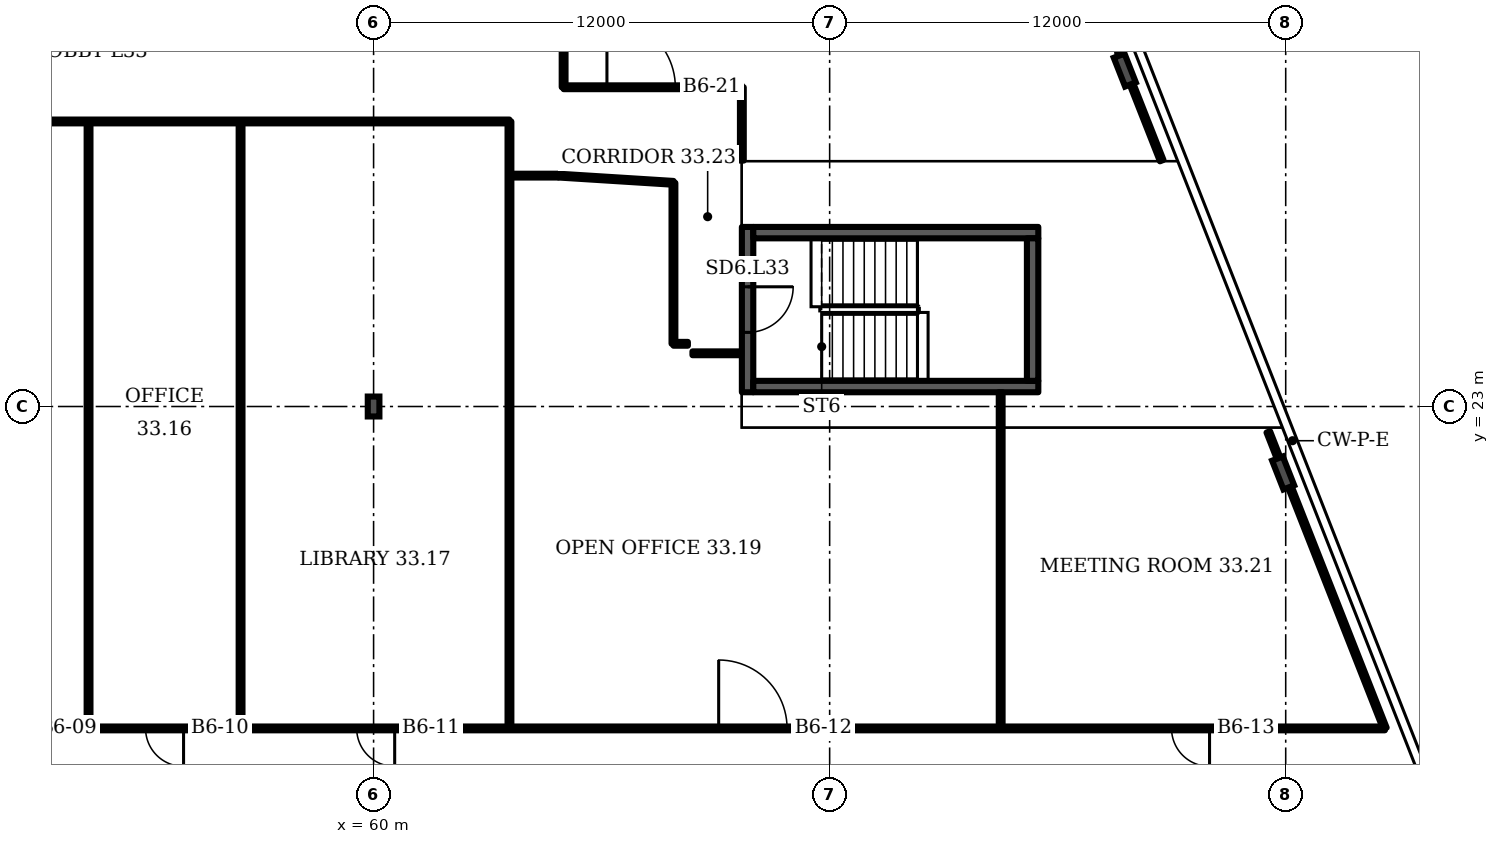
"""IFC4 building model, lengths in metres.
Left out: names, types, materials, properties, quantities, classifications, styles, units other than length and angle.
Written with IfcOpenShell. Run it as: python <this file> out.ifc"""

import sys

from ifc_helpers import new_model, si_unit, direction, frame, frame_2d, origin, origin_2d, place, context, subcontext, project, spatial, rectangle, i_section, extrude, element, fill, save


model = new_model("IFC4")
c1 = context("Model", 3, precision=1e-05, world=origin(), true_north=direction((0.0, 1.0)))
c2 = subcontext(c1, "Body", "Model", "MODEL_VIEW")
j1 = project(units=[si_unit("LENGTHUNIT", "METRE"), si_unit("PLANEANGLEUNIT", "RADIAN")], contexts=[c1])
p1 = place(None, origin())
s1 = spatial("IfcSite", under=j1, at=p1, CompositionType="ELEMENT")
p2 = place(p1, origin())
s2 = spatial("IfcBuilding", under=s1, at=p2, CompositionType="ELEMENT")
p3 = place(p2, frame((0.0, 0.0, 139.9)))
s3 = spatial("IfcBuildingStorey", under=s2, at=p3, CompositionType="ELEMENT", Elevation=139.9)
for number, where, z_axis, x_axis in (
    (1, (83.933, 21.251, 0.0), (0.0, 0.0, 1.0), (0.931, 0.366, 0.0)),
    (2, (79.766, 31.853, 0.0), (0.0, 0.0, 1.0), (0.931, 0.366, 0.0)),
):
    element("IfcColumn", number, at=place(p3, frame(where, z_axis=z_axis, x_axis=x_axis)), inside=s3, PredefinedType="COLUMN", context=c2, shape_type="SweptSolid", body=[
        extrude(i_section(OverallWidth=0.303, OverallDepth=0.814, WebThickness=0.021, FlangeThickness=0.04, FilletRadius=0.03, at=origin_2d()), origin(), (0.0, 0.0, 1.0), 3.6),
    ])
p4 = place(p3, frame((60.0, 23.0, 0.0), z_axis=(0.0, 0.0, 1.0), x_axis=(1.0, 0.0, 0.0)))
e3 = element("IfcColumn", 3, at=p4, inside=s3, PredefinedType="COLUMN", context=c2, shape_type="SweptSolid", body=[
    extrude(i_section(OverallWidth=0.306, OverallDepth=0.524, WebThickness=0.021, FlangeThickness=0.04, FilletRadius=0.027, at=origin_2d()), origin(), (0.0, 0.0, 1.0), 3.6),
])
p5 = place(p3, frame((69.84, 23.375, 0.0), z_axis=(0.0, 0.0, 1.0), x_axis=(0.0, 1.0, 0.0)))
e4 = element("IfcWall", 4, at=p5, inside=s3, PredefinedType="SHEAR", context=c2, shape_type="SweptSolid", body=[
    extrude(rectangle(XDim=4.35, YDim=0.3, at=frame_2d((2.175, 0.0))), origin(), (0.0, 0.0, 1.0), 3.2),
])
p6 = place(p5, frame((1.575, 0.0, 0.0)))
e5 = element("IfcOpeningElement", 5, at=p6, cuts=e4, PredefinedType="OPENING", context=c2, shape_type="SweptSolid", body=[
    extrude(rectangle(XDim=1.2, YDim=2.1, at=frame_2d((0.6, 1.05))), frame((0.0, 0.16, 0.0), z_axis=(0.0, -1.0, 0.0), x_axis=(1.0, 0.0, 0.0)), (0.0, 0.0, 1.0), 0.32),
])
p7 = place(p3, frame((18.2, 14.53, 0.0), z_axis=(0.0, 0.0, 1.0), x_axis=(1.0, 0.0, 0.0)))
e6 = element("IfcWall", 6, at=p7, inside=s3, PredefinedType="PARTITIONING", context=c2, shape_type="SweptSolid", body=[
    extrude(rectangle(XDim=68.41, YDim=0.1, at=frame_2d((34.205, 0.0))), origin(), (0.0, 0.0, 1.0), 3.2),
])
p8 = place(p7, frame((4.605, 0.0, 0.0)))
e7 = element("IfcOpeningElement", 7, at=p8, cuts=e6, PredefinedType="OPENING", context=c2, shape_type="SweptSolid", body=[
    extrude(rectangle(XDim=1.0, YDim=2.1, at=frame_2d((0.5, 1.05))), frame((0.0, 0.06, 0.0), z_axis=(0.0, -1.0, 0.0), x_axis=(1.0, 0.0, 0.0)), (0.0, 0.0, 1.0), 0.12),
])
p9 = place(p7, frame((23.88, 0.0, 0.0)))
e8 = element("IfcOpeningElement", 8, at=p9, cuts=e6, PredefinedType="OPENING", context=c2, shape_type="SweptSolid", body=[
    extrude(rectangle(XDim=1.0, YDim=2.1, at=frame_2d((0.5, 1.05))), frame((0.0, 0.06, 0.0), z_axis=(0.0, -1.0, 0.0), x_axis=(1.0, 0.0, 0.0)), (0.0, 0.0, 1.0), 0.12),
])
p10 = place(p7, frame((27.8, 0.0, 0.0)))
e9 = element("IfcOpeningElement", 9, at=p10, cuts=e6, PredefinedType="OPENING", context=c2, shape_type="SweptSolid", body=[
    extrude(rectangle(XDim=1.0, YDim=2.1, at=frame_2d((0.5, 1.05))), frame((0.0, 0.06, 0.0), z_axis=(0.0, -1.0, 0.0), x_axis=(1.0, 0.0, 0.0)), (0.0, 0.0, 1.0), 0.12),
])
p11 = place(p7, frame((31.8, 0.0, 0.0)))
e10 = element("IfcOpeningElement", 10, at=p11, cuts=e6, PredefinedType="OPENING", context=c2, shape_type="SweptSolid", body=[
    extrude(rectangle(XDim=1.0, YDim=2.1, at=frame_2d((0.5, 1.05))), frame((0.0, 0.06, 0.0), z_axis=(0.0, -1.0, 0.0), x_axis=(1.0, 0.0, 0.0)), (0.0, 0.0, 1.0), 0.12),
])
p12 = place(p7, frame((35.8, 0.0, 0.0)))
e11 = element("IfcOpeningElement", 11, at=p12, cuts=e6, PredefinedType="OPENING", context=c2, shape_type="SweptSolid", body=[
    extrude(rectangle(XDim=1.0, YDim=2.1, at=frame_2d((0.5, 1.05))), frame((0.0, 0.06, 0.0), z_axis=(0.0, -1.0, 0.0), x_axis=(1.0, 0.0, 0.0)), (0.0, 0.0, 1.0), 0.12),
])
p13 = place(p7, frame((41.355, 0.0, 0.0)))
e12 = element("IfcOpeningElement", 12, at=p13, cuts=e6, PredefinedType="OPENING", context=c2, shape_type="SweptSolid", body=[
    extrude(rectangle(XDim=1.0, YDim=2.1, at=frame_2d((0.5, 1.05))), frame((0.0, 0.06, 0.0), z_axis=(0.0, -1.0, 0.0), x_axis=(1.0, 0.0, 0.0)), (0.0, 0.0, 1.0), 0.12),
])
p14 = place(p7, frame((50.88, 0.0, 0.0)))
e13 = element("IfcOpeningElement", 13, at=p14, cuts=e6, PredefinedType="OPENING", context=c2, shape_type="SweptSolid", body=[
    extrude(rectangle(XDim=1.8, YDim=2.1, at=frame_2d((0.9, 1.05))), frame((0.0, 0.06, 0.0), z_axis=(0.0, -1.0, 0.0), x_axis=(1.0, 0.0, 0.0)), (0.0, 0.0, 1.0), 0.12),
])
p15 = place(p7, frame((62.796, 0.0, 0.0)))
e14 = element("IfcOpeningElement", 14, at=p15, cuts=e6, PredefinedType="OPENING", context=c2, shape_type="SweptSolid", body=[
    extrude(rectangle(XDim=1.0, YDim=2.1, at=frame_2d((0.5, 1.05))), frame((0.0, 0.06, 0.0), z_axis=(0.0, -1.0, 0.0), x_axis=(1.0, 0.0, 0.0)), (0.0, 0.0, 1.0), 0.12),
])
for number, where, z_axis, x_axis in (
    (15, (52.5, 14.53, 0.0), (0.0, 0.0, 1.0), (0.0, 1.0, 0.0)),
    (16, (56.5, 14.53, 0.0), (0.0, 0.0, 1.0), (0.0, 1.0, 0.0)),
    (17, (63.575, 14.53, 0.0), (0.0, 0.0, 1.0), (0.0, 1.0, 0.0)),
):
    element("IfcWall", number, at=place(p3, frame(where, z_axis=z_axis, x_axis=x_axis)), inside=s3, PredefinedType="PARTITIONING", context=c2, shape_type="SweptSolid", body=[
        extrude(rectangle(XDim=15.97, YDim=0.1, at=frame_2d((7.985, 0.0))), origin(), (0.0, 0.0, 1.0), 3.2),
    ])
p16 = place(p3, frame((63.575, 29.075, 0.0), z_axis=(0.0, 0.0, 1.0), x_axis=(1.0, 0.0, 0.0)))
e18 = element("IfcWall", 18, at=p16, inside=s3, PredefinedType="PARTITIONING", context=c2, shape_type="SweptSolid", body=[
    extrude(rectangle(XDim=1.285, YDim=0.1, at=frame_2d((0.643, 0.0))), origin(), (0.0, 0.0, 1.0), 3.2),
])
p17 = place(p3, frame((65.0, 31.4, 0.0), z_axis=(0.0, 0.0, 1.0), x_axis=(0.0, 1.0, 0.0)))
e19 = element("IfcWall", 19, at=p17, inside=s3, PredefinedType="PARTITIONING", context=c2, shape_type="SweptSolid", body=[
    extrude(rectangle(XDim=2.58, YDim=0.1, at=frame_2d((1.29, 0.0))), origin(), (0.0, 0.0, 1.0), 3.2),
])
p18 = place(p3, frame((65.0, 31.4, 0.0), z_axis=(0.0, 0.0, 1.0), x_axis=(1.0, 0.0, 0.0)))
e20 = element("IfcWall", 20, at=p18, inside=s3, PredefinedType="PARTITIONING", context=c2, shape_type="SweptSolid", body=[
    extrude(rectangle(XDim=4.69, YDim=0.1, at=frame_2d((2.345, 0.0))), origin(), (0.0, 0.0, 1.0), 3.2),
])
p19 = place(p18, frame((1.14, 0.0, 0.0)))
e21 = element("IfcOpeningElement", 21, at=p19, cuts=e20, PredefinedType="OPENING", context=c2, shape_type="SweptSolid", body=[
    extrude(rectangle(XDim=1.8, YDim=2.1, at=frame_2d((0.9, 1.05))), frame((0.0, 0.06, 0.0), z_axis=(0.0, -1.0, 0.0), x_axis=(1.0, 0.0, 0.0)), (0.0, 0.0, 1.0), 0.12),
])
p20 = place(p3, frame((67.89, 24.65, 0.0), z_axis=(0.0, 0.0, 1.0), x_axis=(0.0, 1.0, 0.0)))
e22 = element("IfcWall", 22, at=p20, inside=s3, PredefinedType="PARTITIONING", context=c2, shape_type="SweptSolid", body=[
    extrude(rectangle(XDim=4.235, YDim=0.1, at=frame_2d((2.118, 0.0))), origin(), (0.0, 0.0, 1.0), 3.2),
])
p21 = place(p3, frame((67.89, 24.65, 0.0), z_axis=(0.0, 0.0, 1.0), x_axis=(1.0, 0.0, 0.0)))
e23 = element("IfcWall", 23, at=p21, inside=s3, PredefinedType="PARTITIONING", context=c2, shape_type="SweptSolid", body=[
    extrude(rectangle(XDim=0.38, YDim=0.1, at=frame_2d((0.19, 0.0))), origin(), (0.0, 0.0, 1.0), 3.2),
])
p22 = place(p3, frame((67.89, 28.885, 0.0), z_axis=(0.0, 0.0, 1.0), x_axis=(-0.998031, 0.062786, 0.0)))
e24 = element("IfcWall", 24, at=p22, inside=s3, PredefinedType="PARTITIONING", context=c2, shape_type="SweptSolid", body=[
    extrude(rectangle(XDim=3.021, YDim=0.1, at=frame_2d((1.511, 0.0))), origin(), (0.0, 0.0, 1.0), 3.2),
])
p23 = place(p3, frame((68.39, 24.4, 0.0), z_axis=(0.0, 0.0, 1.0), x_axis=(1.0, 0.0, 0.0)))
e25 = element("IfcWall", 25, at=p23, inside=s3, PredefinedType="PARTITIONING", context=c2, shape_type="SweptSolid", body=[
    extrude(rectangle(XDim=1.281, YDim=0.1, at=frame_2d((0.64, 0.0))), origin(), (0.0, 0.0, 1.0), 3.2),
])
p24 = place(p3, frame((69.69, 29.47, 0.0), z_axis=(0.0, 0.0, 1.0), x_axis=(0.0, 1.0, 0.0)))
e26 = element("IfcWall", 26, at=p24, inside=s3, PredefinedType="PARTITIONING", context=c2, shape_type="SweptSolid", body=[
    extrude(rectangle(XDim=1.93, YDim=0.1, at=frame_2d((0.965, 0.0))), origin(), (0.0, 0.0, 1.0), 3.2),
])
p25 = place(p3, frame((76.5, 14.53, 0.0), z_axis=(0.0, 0.0, 1.0), x_axis=(0.0, 1.0, 0.0)))
e27 = element("IfcWall", 27, at=p25, inside=s3, PredefinedType="PARTITIONING", context=c2, shape_type="SweptSolid", body=[
    extrude(rectangle(XDim=8.845, YDim=0.1, at=frame_2d((4.422, 0.0))), origin(), (0.0, 0.0, 1.0), 3.2),
])
p26 = place(p3, frame((80.737, 29.47, 0.0), z_axis=(0.0, 0.0, 1.0), x_axis=(-0.366592, 0.930378, 0.0)))
e28 = element("IfcWall", 28, at=p26, inside=s3, PredefinedType="PARTITIONING", context=c2, shape_type="SweptSolid", body=[
    extrude(rectangle(XDim=3.074, YDim=0.1, at=frame_2d((1.537, 0.0))), origin(), (0.0, 0.0, 1.0), 2.58),
])
p27 = place(p3, frame((83.96, 21.265, 0.0), z_axis=(0.0, 0.0, 1.0), x_axis=(-0.364889, 0.931052, 0.0)))
e29 = element("IfcWall", 29, at=p27, inside=s3, PredefinedType="PARTITIONING", context=c2, shape_type="SweptSolid", body=[
    extrude(rectangle(XDim=1.147, YDim=0.1, at=frame_2d((0.574, 0.0))), origin(), (0.0, 0.0, 1.0), 2.58),
])
p28 = place(p3, frame((86.61, 14.53, 0.0), z_axis=(0.0, 0.0, 1.0), x_axis=(-0.366129, 0.930561, 0.0)))
e30 = element("IfcWall", 30, at=p28, inside=s3, PredefinedType="PARTITIONING", context=c2, shape_type="SweptSolid", body=[
    extrude(rectangle(XDim=7.226, YDim=0.1, at=frame_2d((3.613, 0.0))), origin(), (0.0, 0.0, 1.0), 2.58),
])
p29 = place(p3, frame((44.15, 30.5, 0.0), z_axis=(0.0, 0.0, 1.0), x_axis=(1.0, 0.0, 0.0)))
e31 = element("IfcWall", 31, at=p29, inside=s3, PredefinedType="PARTITIONING", context=c2, shape_type="SweptSolid", body=[
    extrude(rectangle(XDim=19.425, YDim=0.1, at=frame_2d((9.712, 0.0))), origin(), (0.0, 0.0, 1.0), 3.2),
])
for number, where, z_axis, x_axis in (
    (32, (69.99, 23.525, 0.0), (0.0, 0.0, 1.0), (1.0, 0.0, 0.0)),
    (33, (69.99, 27.575, 0.0), (0.0, 0.0, 1.0), (1.0, 0.0, 0.0)),
):
    element("IfcWall", number, at=place(p3, frame(where, z_axis=z_axis, x_axis=x_axis)), inside=s3, PredefinedType="SHEAR", context=c2, shape_type="SweptSolid", body=[
        extrude(rectangle(XDim=7.5, YDim=0.3, at=frame_2d((3.75, 0.0))), origin(), (0.0, 0.0, 1.0), 3.2),
    ])
p30 = place(p3, frame((77.34, 23.675, 0.0), z_axis=(0.0, 0.0, 1.0), x_axis=(0.0, 1.0, 0.0)))
e34 = element("IfcWall", 34, at=p30, inside=s3, PredefinedType="SHEAR", context=c2, shape_type="SweptSolid", body=[
    extrude(rectangle(XDim=3.75, YDim=0.3, at=frame_2d((1.875, 0.0))), origin(), (0.0, 0.0, 1.0), 3.2),
])
p31 = place(p6, origin())
e35 = element("IfcDoor", 35, at=p31, inside=s3, OperationType="SINGLE_SWING_RIGHT", PredefinedType="DOOR", context=c2, shape_type="SweptSolid", body=[
    extrude(rectangle(XDim=1.2, YDim=2.1, at=frame_2d((0.6, 1.05))), frame((0.0, 0.025, 0.0), z_axis=(0.0, -1.0, 0.0), x_axis=(1.0, 0.0, 0.0)), (0.0, 0.0, 1.0), 0.05),
])
fill(e5, e35)
p32 = place(p12, origin())
e36 = element("IfcDoor", 36, at=p32, inside=s3, OperationType="SINGLE_SWING_RIGHT", PredefinedType="DOOR", context=c2, shape_type="SweptSolid", body=[
    extrude(rectangle(XDim=1.0, YDim=2.1, at=frame_2d((0.5, 1.05))), frame((0.0, 0.025, 0.0), z_axis=(0.0, -1.0, 0.0), x_axis=(1.0, 0.0, 0.0)), (0.0, 0.0, 1.0), 0.05),
])
fill(e11, e36)
p33 = place(p13, origin())
e37 = element("IfcDoor", 37, at=p33, inside=s3, OperationType="SINGLE_SWING_RIGHT", PredefinedType="DOOR", context=c2, shape_type="SweptSolid", body=[
    extrude(rectangle(XDim=1.0, YDim=2.1, at=frame_2d((0.5, 1.05))), frame((0.0, 0.025, 0.0), z_axis=(0.0, -1.0, 0.0), x_axis=(1.0, 0.0, 0.0)), (0.0, 0.0, 1.0), 0.05),
])
fill(e12, e37)
p34 = place(p14, origin())
e38 = element("IfcDoor", 38, at=p34, inside=s3, OperationType="DOUBLE_DOOR_SINGLE_SWING", PredefinedType="DOOR", context=c2, shape_type="SweptSolid", body=[
    extrude(rectangle(XDim=1.8, YDim=2.1, at=frame_2d((0.9, 1.05))), frame((0.0, 0.025, 0.0), z_axis=(0.0, -1.0, 0.0), x_axis=(1.0, 0.0, 0.0)), (0.0, 0.0, 1.0), 0.05),
])
fill(e13, e38)
p35 = place(p15, origin())
e39 = element("IfcDoor", 39, at=p35, inside=s3, OperationType="SINGLE_SWING_RIGHT", PredefinedType="DOOR", context=c2, shape_type="SweptSolid", body=[
    extrude(rectangle(XDim=1.0, YDim=2.1, at=frame_2d((0.5, 1.05))), frame((0.0, 0.025, 0.0), z_axis=(0.0, -1.0, 0.0), x_axis=(1.0, 0.0, 0.0)), (0.0, 0.0, 1.0), 0.05),
])
fill(e14, e39)
p36 = place(p19, origin())
e40 = element("IfcDoor", 40, at=p36, inside=s3, OperationType="DOUBLE_DOOR_SINGLE_SWING", PredefinedType="DOOR", context=c2, shape_type="SweptSolid", body=[
    extrude(rectangle(XDim=1.8, YDim=2.1, at=frame_2d((0.9, 1.05))), frame((0.0, 0.025, 0.0), z_axis=(0.0, -1.0, 0.0), x_axis=(1.0, 0.0, 0.0)), (0.0, 0.0, 1.0), 0.05),
])
fill(e21, e40)
save(model, sys.argv[1])
